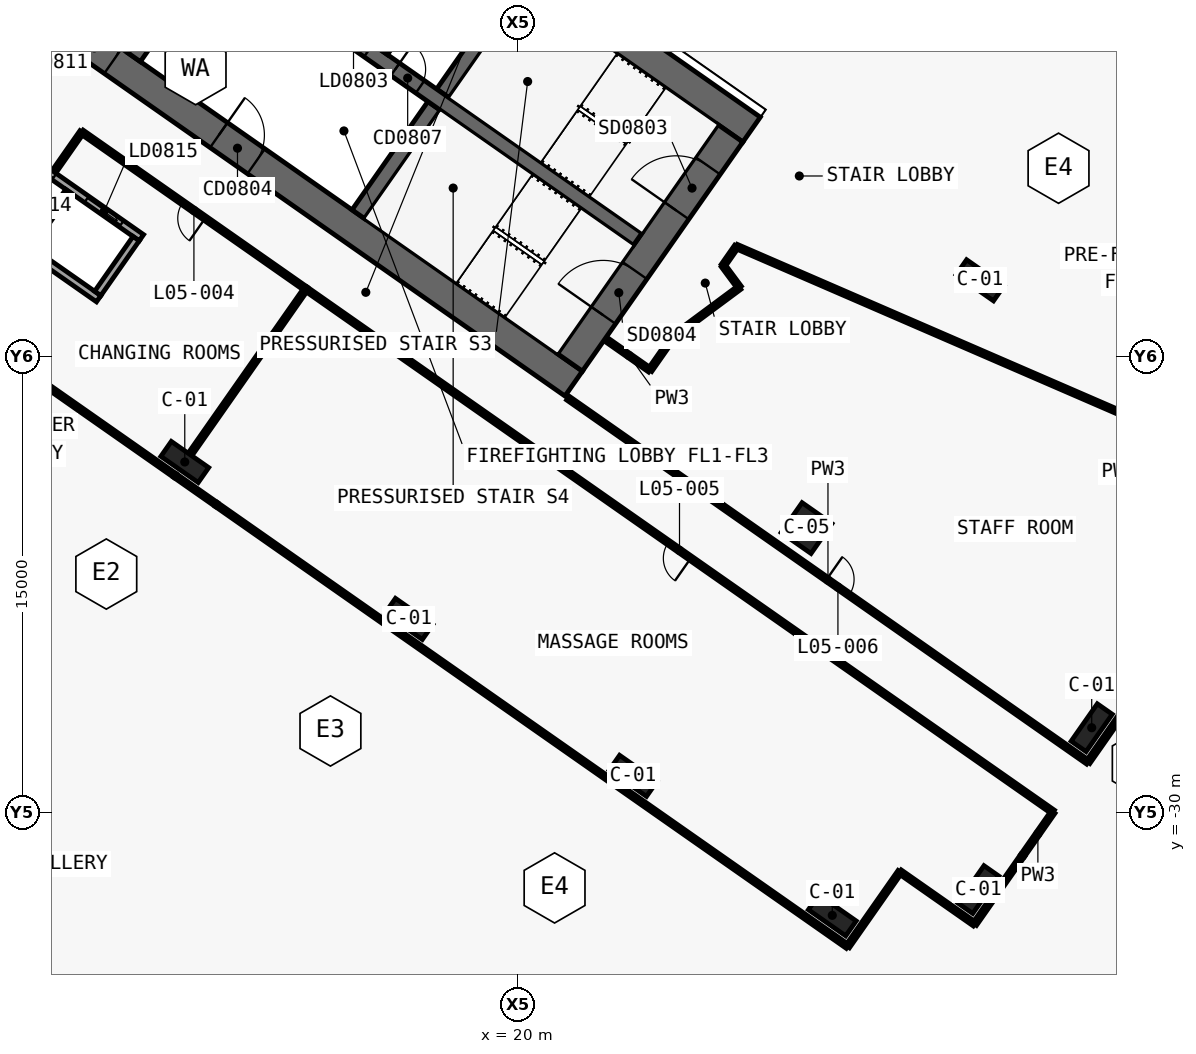
"""IFC4 building model, lengths in metres.
Left out: names, types, materials, properties, quantities, classifications, styles, units other than length and angle.
Written with IfcOpenShell. Run it as: python <this file> out.ifc"""

import sys

from ifc_helpers import new_model, si_unit, direction, frame, frame_2d, origin, origin_2d, place, context, subcontext, project, spatial, polyline, rectangle, outline, extrude, element, fill, save


model = new_model("IFC4")
c1 = context("Model", 3, precision=1e-05, world=origin(), true_north=direction((0.0, 1.0)))
c2 = subcontext(c1, "Body", "Model", "MODEL_VIEW")
j1 = project(units=[si_unit("LENGTHUNIT", "METRE"), si_unit("PLANEANGLEUNIT", "RADIAN")], contexts=[c1])
p1 = place(None, origin())
s1 = spatial("IfcSite", under=j1, at=p1, CompositionType="ELEMENT")
p2 = place(p1, origin())
s2 = spatial("IfcBuilding", under=s1, at=p2, CompositionType="ELEMENT")
p3 = place(p2, frame((0.0, 0.0, 37.5)))
s3 = spatial("IfcBuildingStorey", under=s2, at=p3, CompositionType="ELEMENT", Elevation=37.5)
p4 = place(p3, frame((-0.037, 11.867, 0.0), z_axis=(0.0, 0.0, 1.0), x_axis=(0.819155306259, -0.573571777746, 0.0)))
e1 = element("IfcWall", 1, at=p4, inside=s3, PredefinedType="SHEAR", context=c2, shape_type="SweptSolid", body=[
    extrude(outline(polyline([(33.837, 0.5), (0.0, 0.5), (0.7, -0.5), (33.837, -0.5), (33.837, 0.5)])), origin(), (0.0, 0.0, 1.0), 5.5),
])
p5 = place(p3, frame((-0.037, -0.585, 0.0), z_axis=(0.0, 0.0, 1.0), x_axis=(0.819157152511, -0.573569140985, 0.0)))
e2 = element("IfcWall", 2, at=p5, inside=s3, PredefinedType="SHEAR", context=c2, shape_type="SweptSolid", body=[
    extrude(outline(polyline([(26.695, 0.5), (0.0, 0.5), (0.7, -0.5), (26.695, -0.5), (26.695, 0.5)])), origin(), (0.0, 0.0, 1.0), 5.5),
])
p6 = place(p5, frame((6.695, 0.0, 0.0)))
e3 = element("IfcOpeningElement", 3, at=p6, cuts=e2, PredefinedType="OPENING", context=c2, shape_type="SweptSolid", body=[
    extrude(rectangle(XDim=1.5, YDim=2.1, at=frame_2d((0.75, 1.05))), frame((0.0, 0.51, 0.0), z_axis=(0.0, -1.0, 0.0), x_axis=(1.0, 0.0, 0.0)), (0.0, 0.0, 1.0), 1.02),
])
p7 = place(p5, frame((12.445, 0.0, 0.0)))
e4 = element("IfcOpeningElement", 4, at=p7, cuts=e2, PredefinedType="OPENING", context=c2, shape_type="SweptSolid", body=[
    extrude(rectangle(XDim=1.5, YDim=2.1, at=frame_2d((0.75, 1.05))), frame((0.0, 0.51, 0.0), z_axis=(0.0, -1.0, 0.0), x_axis=(1.0, 0.0, 0.0)), (0.0, 0.0, 1.0), 1.02),
])
p8 = place(p3, frame((21.708, -15.2, 0.0), z_axis=(0.0, 0.0, 1.0), x_axis=(0.573576324356, 0.819152122709, 0.0)))
e5 = element("IfcWall", 5, at=p8, inside=s3, PredefinedType="SHEAR", context=c2, shape_type="SweptSolid", body=[
    extrude(outline(polyline([(9.2, 0.5), (0.0, 0.5), (0.0, -0.5), (9.2, -0.5), (9.2, 0.5)])), origin(), (0.0, 0.0, 1.0), 5.5),
])
p9 = place(p8, frame((6.1, 0.0, 0.0)))
e6 = element("IfcOpeningElement", 6, at=p9, cuts=e5, PredefinedType="OPENING", context=c2, shape_type="SweptSolid", body=[
    extrude(rectangle(XDim=1.8, YDim=2.1, at=frame_2d((0.9, 1.05))), frame((0.0, 0.51, 0.0), z_axis=(0.0, -1.0, 0.0), x_axis=(1.0, 0.0, 0.0)), (0.0, 0.0, 1.0), 1.02),
])
p10 = place(p8, frame((1.9, 0.0, 0.0)))
e7 = element("IfcOpeningElement", 7, at=p10, cuts=e5, PredefinedType="OPENING", context=c2, shape_type="SweptSolid", body=[
    extrude(rectangle(XDim=1.8, YDim=2.1, at=frame_2d((0.9, 1.05))), frame((0.0, 0.51, 0.0), z_axis=(0.0, -1.0, 0.0), x_axis=(1.0, 0.0, 0.0)), (0.0, 0.0, 1.0), 1.02),
])
p11 = place(p3, frame((7.372, -5.162, 0.0), z_axis=(0.0, 0.0, 1.0), x_axis=(0.573594173421, 0.819139624372, 0.0)))
e8 = element("IfcWall", 8, at=p11, inside=s3, PredefinedType="SHEAR", context=c2, shape_type="SweptSolid", body=[
    extrude(outline(polyline([(0.0, 0.25), (0.0, -0.25), (4.35, -0.25), (4.35, 0.25), (0.0, 0.25)])), origin(), (0.0, 0.0, 1.0), 5.5),
])
p12 = place(p3, frame((14.745, -10.324, 0.0), z_axis=(0.0, 0.0, 1.0), x_axis=(0.57356780395, 0.819158088694, 0.0)))
e9 = element("IfcWall", 9, at=p12, inside=s3, PredefinedType="SHEAR", context=c2, shape_type="SweptSolid", body=[
    extrude(outline(polyline([(0.0, 0.25), (0.0, -0.25), (4.35, -0.25), (4.35, 0.25), (0.0, 0.25)])), origin(), (0.0, 0.0, 1.0), 5.5),
])
p13 = place(p3, frame((17.527, -6.352, 0.0), z_axis=(0.0, 0.0, 1.0), x_axis=(0.573530143085, 0.819184457233, 0.0)))
e10 = element("IfcWall", 10, at=p13, inside=s3, PredefinedType="SHEAR", context=c2, shape_type="SweptSolid", body=[
    extrude(outline(polyline([(4.35, -0.25), (4.35, 0.25), (0.0, 0.25), (0.0, -0.25), (4.35, -0.25)])), origin(), (0.0, 0.0, 1.0), 5.5),
])
p14 = place(p3, frame((2.638, 3.768, 0.0), z_axis=(0.0, 0.0, 1.0), x_axis=(0.819148977158, -0.573580816643, 0.0)))
e11 = element("IfcWall", 11, at=p14, inside=s3, PredefinedType="SHEAR", context=c2, shape_type="SweptSolid", body=[
    extrude(outline(polyline([(0.0, 0.25), (0.0, -0.25), (26.0, -0.25), (26.0, 0.25), (0.0, 0.25)])), origin(), (0.0, 0.0, 1.0), 5.5),
])
p15 = place(p14, frame((9.637, 0.0, 0.0)))
e12 = element("IfcOpeningElement", 12, at=p15, cuts=e11, PredefinedType="OPENING", context=c2, shape_type="SweptSolid", body=[
    extrude(rectangle(XDim=1.2, YDim=2.1, at=frame_2d((0.6, 1.05))), frame((0.0, 0.26, 0.0), z_axis=(0.0, -1.0, 0.0), x_axis=(1.0, 0.0, 0.0)), (0.0, 0.0, 1.0), 0.52),
])
p16 = place(p14, frame((11.812, 0.0, 0.0)))
e13 = element("IfcOpeningElement", 13, at=p16, cuts=e11, PredefinedType="OPENING", context=c2, shape_type="SweptSolid", body=[
    extrude(rectangle(XDim=1.2, YDim=2.1, at=frame_2d((0.6, 1.05))), frame((0.0, 0.26, 0.0), z_axis=(0.0, -1.0, 0.0), x_axis=(1.0, 0.0, 0.0)), (0.0, 0.0, 1.0), 0.52),
])
p17 = place(p14, frame((13.988, 0.0, 0.0)))
e14 = element("IfcOpeningElement", 14, at=p17, cuts=e11, PredefinedType="OPENING", context=c2, shape_type="SweptSolid", body=[
    extrude(rectangle(XDim=1.2, YDim=2.1, at=frame_2d((0.6, 1.05))), frame((0.0, 0.26, 0.0), z_axis=(0.0, -1.0, 0.0), x_axis=(1.0, 0.0, 0.0)), (0.0, 0.0, 1.0), 0.52),
])
p18 = place(p14, frame((16.262, 0.0, 0.0)))
e15 = element("IfcOpeningElement", 15, at=p18, cuts=e11, PredefinedType="OPENING", context=c2, shape_type="SweptSolid", body=[
    extrude(rectangle(XDim=1.0, YDim=2.1, at=frame_2d((0.5, 1.05))), frame((0.0, 0.26, 0.0), z_axis=(0.0, -1.0, 0.0), x_axis=(1.0, 0.0, 0.0)), (0.0, 0.0, 1.0), 0.52),
])
for number, where, z_axis, x_axis in (
    (16, (9.038, -18.475, 0.0), (0.0, 0.0, 1.0), (0.819, -0.574, 0.0)),
    (17, (16.41, -23.637, 0.0), (0.0, 0.0, 1.0), (0.819, -0.574, 0.0)),
    (18, (23.782, -28.799, 0.0), (0.0, 0.0, 1.0), (0.819, -0.574, 0.0)),
    (19, (30.336, -33.388, 0.0), (0.0, 0.0, 1.0), (0.819, -0.574, 0.0)),
    (20, (35.197, -12.498, 0.0), (0.0, 0.0, 1.0), (0.819, -0.574, 0.0)),
    (21, (35.14, -32.541, 0.0), (0.0, 0.0, 1.0), (0.574, 0.819, 0.0)),
    (22, (38.869, -27.216, 0.0), (0.0, 0.0, 1.0), (0.574, 0.819, 0.0)),
):
    element("IfcColumn", number, at=place(p3, frame(where, z_axis=z_axis, x_axis=x_axis)), inside=s3, PredefinedType="COLUMN", context=c2, shape_type="SweptSolid", body=[
        extrude(rectangle(XDim=1.5, YDim=0.6, at=origin_2d()), origin(), (0.0, 0.0, 1.0), 5.5),
    ])
p19 = place(p3, frame((29.49, -20.649, 0.0), z_axis=(0.0, 0.0, 1.0), x_axis=(0.819152044289, -0.573576436351, 0.0)))
e23 = element("IfcColumn", 23, at=p19, inside=s3, PredefinedType="COLUMN", context=c2, shape_type="SweptSolid", body=[
    extrude(rectangle(XDim=1.2, YDim=1.2, at=origin_2d()), origin(), (0.0, 0.0, 1.0), 5.5),
])
p20 = place(p3, frame((15.622, -5.018, 0.0), z_axis=(0.0, 0.0, 1.0), x_axis=(0.573594173421, 0.819139624372, 0.0)))
e24 = element("IfcWall", 24, at=p20, inside=s3, PredefinedType="SOLIDWALL", context=c2, shape_type="SweptSolid", body=[
    extrude(rectangle(XDim=4.35, YDim=0.2, at=frame_2d((2.175, 0.0))), origin(), (0.0, 0.0, 1.0), 5.5),
])
p21 = place(p3, frame((-2.887, -6.738, 0.0), z_axis=(0.0, 0.0, 1.0), x_axis=(0.819150280716, -0.573578954985, 0.0)))
e25 = element("IfcWall", 25, at=p21, inside=s3, PredefinedType="SOLIDWALL", context=c2, shape_type="SweptSolid", body=[
    extrude(rectangle(XDim=11.1, YDim=0.25, at=frame_2d((5.55, 0.0))), origin(), (0.0, 0.0, 1.0), 5.5),
])
p22 = place(p3, frame((-1.481, -4.731, 0.0), z_axis=(0.0, 0.0, 1.0), x_axis=(0.819150280716, -0.573578954985, 0.0)))
e26 = element("IfcWall", 26, at=p22, inside=s3, PredefinedType="SOLIDWALL", context=c2, shape_type="SweptSolid", body=[
    extrude(rectangle(XDim=11.1, YDim=0.25, at=frame_2d((5.55, 0.0))), origin(), (0.0, 0.0, 1.0), 5.5),
])
p23 = place(p22, frame((0.8, 0.0, 0.0)))
e27 = element("IfcOpeningElement", 27, at=p23, cuts=e26, PredefinedType="OPENING", context=c2, shape_type="SweptSolid", body=[
    extrude(rectangle(XDim=1.4, YDim=2.1, at=frame_2d((0.7, 1.05))), frame((0.0, 0.135, 0.0), z_axis=(0.0, -1.0, 0.0), x_axis=(1.0, 0.0, 0.0)), (0.0, 0.0, 1.0), 0.27),
])
p24 = place(p22, frame((3.5, 0.0, 0.0)))
e28 = element("IfcOpeningElement", 28, at=p24, cuts=e26, PredefinedType="OPENING", context=c2, shape_type="SweptSolid", body=[
    extrude(rectangle(XDim=1.4, YDim=2.1, at=frame_2d((0.7, 1.05))), frame((0.0, 0.135, 0.0), z_axis=(0.0, -1.0, 0.0), x_axis=(1.0, 0.0, 0.0)), (0.0, 0.0, 1.0), 0.27),
])
p25 = place(p22, frame((6.2, 0.0, 0.0)))
e29 = element("IfcOpeningElement", 29, at=p25, cuts=e26, PredefinedType="OPENING", context=c2, shape_type="SweptSolid", body=[
    extrude(rectangle(XDim=1.4, YDim=2.1, at=frame_2d((0.7, 1.05))), frame((0.0, 0.135, 0.0), z_axis=(0.0, -1.0, 0.0), x_axis=(1.0, 0.0, 0.0)), (0.0, 0.0, 1.0), 0.27),
])
p26 = place(p22, frame((8.9, 0.0, 0.0)))
e30 = element("IfcOpeningElement", 30, at=p26, cuts=e26, PredefinedType="OPENING", context=c2, shape_type="SweptSolid", body=[
    extrude(rectangle(XDim=1.4, YDim=2.1, at=frame_2d((0.7, 1.05))), frame((0.0, 0.135, 0.0), z_axis=(0.0, -1.0, 0.0), x_axis=(1.0, 0.0, 0.0)), (0.0, 0.0, 1.0), 0.27),
])
p27 = place(p3, frame((6.175, -12.93, 0.0), z_axis=(0.0, 0.0, 1.0), x_axis=(0.573559170999, 0.819164133348, 0.0)))
e31 = element("IfcWall", 31, at=p27, inside=s3, PredefinedType="SOLIDWALL", context=c2, shape_type="SweptSolid", body=[
    extrude(rectangle(XDim=2.2, YDim=0.25, at=frame_2d((1.1, 0.0))), origin(), (0.0, 0.0, 1.0), 5.5),
])
p28 = place(p3, frame((3.943, -11.367, 0.0), z_axis=(0.0, 0.0, 1.0), x_axis=(0.573507030513, 0.819200638399, 0.0)))
e32 = element("IfcWall", 32, at=p28, inside=s3, PredefinedType="SOLIDWALL", context=c2, shape_type="SweptSolid", body=[
    extrude(rectangle(XDim=2.2, YDim=0.2, at=frame_2d((1.1, 0.0))), origin(), (0.0, 0.0, 1.0), 5.5),
])
p29 = place(p3, frame((21.642, -16.375, 0.0), z_axis=(0.0, 0.0, 1.0), x_axis=(0.819148965066, -0.573580833911, 0.0)))
e33 = element("IfcWall", 33, at=p29, inside=s3, PredefinedType="PARTITIONING", context=c2, shape_type="SweptSolid", body=[
    extrude(rectangle(XDim=20.88, YDim=0.15, at=frame_2d((10.44, 0.0))), origin(), (0.0, 0.0, 1.0), 3.68),
])
p30 = place(p29, frame((10.39, 0.0, 0.0)))
e34 = element("IfcOpeningElement", 34, at=p30, cuts=e33, PredefinedType="OPENING", context=c2, shape_type="SweptSolid", body=[
    extrude(rectangle(XDim=0.9, YDim=2.1, at=frame_2d((0.45, 1.05))), frame((0.0, 0.085, 0.0), z_axis=(0.0, -1.0, 0.0), x_axis=(1.0, 0.0, 0.0)), (0.0, 0.0, 1.0), 0.17),
])
p31 = place(p3, frame((13.026, -12.783, 0.0), z_axis=(0.0, 0.0, 1.0), x_axis=(-0.81915291695, 0.57357519006, 0.0)))
e35 = element("IfcWall", 35, at=p31, inside=s3, PredefinedType="PARTITIONING", context=c2, shape_type="SweptSolid", body=[
    extrude(rectangle(XDim=9.002, YDim=0.15, at=frame_2d((4.501, 0.0))), origin(), (0.0, 0.0, 1.0), 3.68),
])
p32 = place(p31, frame((4.051, 0.0, 0.0)))
e36 = element("IfcOpeningElement", 36, at=p32, cuts=e35, PredefinedType="OPENING", context=c2, shape_type="SweptSolid", body=[
    extrude(rectangle(XDim=0.9, YDim=2.1, at=frame_2d((0.45, 1.05))), frame((0.0, 0.085, 0.0), z_axis=(0.0, -1.0, 0.0), x_axis=(1.0, 0.0, 0.0)), (0.0, 0.0, 1.0), 0.17),
])
p33 = place(p3, frame((37.599, -29.989, 0.0), z_axis=(0.0, 0.0, 1.0), x_axis=(-0.819154688631, 0.57357265982, 0.0)))
e37 = element("IfcWall", 37, at=p33, inside=s3, PredefinedType="PARTITIONING", context=c2, shape_type="SweptSolid", body=[
    extrude(rectangle(XDim=30.002, YDim=0.15, at=frame_2d((15.001, 0.0))), origin(), (0.0, 0.0, 1.0), 3.68),
])
p34 = place(p33, frame((14.551, 0.0, 0.0)))
e38 = element("IfcOpeningElement", 38, at=p34, cuts=e37, PredefinedType="OPENING", context=c2, shape_type="SweptSolid", body=[
    extrude(rectangle(XDim=0.9, YDim=2.1, at=frame_2d((0.45, 1.05))), frame((0.0, 0.085, 0.0), z_axis=(0.0, -1.0, 0.0), x_axis=(1.0, 0.0, 0.0)), (0.0, 0.0, 1.0), 0.17),
])
p35 = place(p3, frame((43.621, -21.388, 0.0), z_axis=(0.0, 0.0, 1.0), x_axis=(-0.57357799764, -0.819150951061, 0.0)))
e39 = element("IfcWall", 39, at=p35, inside=s3, PredefinedType="PARTITIONING", context=c2, shape_type="SweptSolid", body=[
    extrude(rectangle(XDim=8.5, YDim=0.15, at=frame_2d((4.25, 0.0))), origin(), (0.0, 0.0, 1.0), 5.1),
])
p36 = place(p3, frame((26.746, -12.014, 0.0), z_axis=(0.0, 0.0, 1.0), x_axis=(0.573761975376, 0.819022097146, 0.0)))
e40 = element("IfcWall", 40, at=p36, inside=s3, PredefinedType="PARTITIONING", context=c2, shape_type="SweptSolid", body=[
    extrude(rectangle(XDim=0.765, YDim=0.15, at=frame_2d((0.383, 0.0))), origin(), (0.0, 0.0, 1.0), 5.1),
])
p37 = place(p3, frame((27.185, -11.387, 0.0), z_axis=(0.0, 0.0, 1.0), x_axis=(0.917531384635, -0.397663372979, 0.0)))
e41 = element("IfcWall", 41, at=p37, inside=s3, PredefinedType="PARTITIONING", context=c2, shape_type="SweptSolid", body=[
    extrude(rectangle(XDim=16.536, YDim=0.15, at=frame_2d((8.268, 0.0))), origin(), (0.0, 0.0, 1.0), 3.68),
])
p38 = place(p3, frame((22.961, -14.49, 0.0), z_axis=(0.0, 0.0, 1.0), x_axis=(0.819109000826, -0.573637903879, 0.0)))
e42 = element("IfcWall", 42, at=p38, inside=s3, PredefinedType="PARTITIONING", context=c2, shape_type="SweptSolid", body=[
    extrude(rectangle(XDim=1.68, YDim=0.15, at=frame_2d((0.84, 0.0))), origin(), (0.0, 0.0, 1.0), 5.1),
])
p39 = place(p3, frame((24.337, -15.454, 0.0), z_axis=(0.0, 0.0, 1.0), x_axis=(0.573571252353, 0.819155674139, 0.0)))
e43 = element("IfcWall", 43, at=p39, inside=s3, PredefinedType="PARTITIONING", context=c2, shape_type="SweptSolid", body=[
    extrude(rectangle(XDim=1.354, YDim=0.15, at=frame_2d((0.677, 0.0))), origin(), (0.0, 0.0, 1.0), 5.1),
])
p40 = place(p3, frame((25.114, -14.345, 0.0), z_axis=(0.0, 0.0, 1.0), x_axis=(0.803211070557, 0.595694532571, 0.0)))
e44 = element("IfcWall", 44, at=p40, inside=s3, PredefinedType="PARTITIONING", context=c2, shape_type="SweptSolid", body=[
    extrude(rectangle(XDim=2.7, YDim=0.15, at=frame_2d((1.35, 0.0))), origin(), (0.0, 0.0, 1.0), 5.1),
])
p41 = place(p3, frame((27.282, -12.737, 0.0), z_axis=(0.0, 0.0, 1.0), x_axis=(-0.595869495235, 0.803081281471, 0.0)))
e45 = element("IfcWall", 45, at=p41, inside=s3, PredefinedType="PARTITIONING", context=c2, shape_type="SweptSolid", body=[
    extrude(rectangle(XDim=0.9, YDim=0.15, at=frame_2d((0.45, 0.0))), origin(), (0.0, 0.0, 1.0), 5.1),
])
p42 = place(p3, frame((13.024, -12.782, 0.0), z_axis=(0.0, 0.0, 1.0), x_axis=(-0.573556251799, -0.819166177294, 0.0)))
e46 = element("IfcWall", 46, at=p42, inside=s3, PredefinedType="PARTITIONING", context=c2, shape_type="SweptSolid", body=[
    extrude(rectangle(XDim=6.63, YDim=0.15, at=frame_2d((3.315, 0.0))), origin(), (0.0, 0.0, 1.0), 3.68),
])
p43 = place(p3, frame((8.722, -18.926, 0.0), z_axis=(0.0, 0.0, 1.0), x_axis=(-0.819141427692, 0.573591598124, 0.0)))
e47 = element("IfcWall", 47, at=p43, inside=s3, PredefinedType="PARTITIONING", context=c2, shape_type="SweptSolid", body=[
    extrude(rectangle(XDim=9.0, YDim=0.15, at=frame_2d((4.5, 0.0))), origin(), (0.0, 0.0, 1.0), 5.1),
])
p44 = place(p3, frame((4.763, -8.889, 0.0), z_axis=(0.0, 0.0, 1.0), x_axis=(0.573494057365, 0.819209720504, 0.0)))
e48 = element("IfcWall", 48, at=p44, inside=s3, PredefinedType="PARTITIONING", context=c2, shape_type="SweptSolid", body=[
    extrude(rectangle(XDim=1.55, YDim=0.15, at=frame_2d((0.775, 0.0))), origin(), (0.0, 0.0, 1.0), 3.68),
])
p45 = place(p3, frame((32.56, -31.955, 0.0), z_axis=(0.0, 0.0, 1.0), x_axis=(-0.573560650686, -0.819163097304, 0.0)))
e49 = element("IfcWall", 49, at=p45, inside=s3, PredefinedType="PARTITIONING", context=c2, shape_type="SweptSolid", body=[
    extrude(rectangle(XDim=3.0, YDim=0.15, at=frame_2d((1.5, 0.0))), origin(), (0.0, 0.0, 1.0), 3.88),
])
p46 = place(p3, frame((30.839, -34.412, 0.0), z_axis=(0.0, 0.0, 1.0), x_axis=(-0.819153188106, 0.573574802808, 0.0)))
e50 = element("IfcWall", 50, at=p46, inside=s3, PredefinedType="PARTITIONING", context=c2, shape_type="SweptSolid", body=[
    extrude(rectangle(XDim=25.351, YDim=0.15, at=frame_2d((12.675, 0.0))), origin(), (0.0, 0.0, 1.0), 5.1),
])
p47 = place(p3, frame((36.599, -31.417, 0.0), z_axis=(0.0, 0.0, 1.0), x_axis=(-0.573557416232, -0.819165361991, 0.0)))
e51 = element("IfcWall", 51, at=p47, inside=s3, PredefinedType="PARTITIONING", context=c2, shape_type="SweptSolid", body=[
    extrude(rectangle(XDim=2.757, YDim=0.15, at=frame_2d((1.379, 0.0))), origin(), (0.0, 0.0, 1.0), 5.1),
])
p48 = place(p3, frame((35.018, -33.675, 0.0), z_axis=(0.0, 0.0, 1.0), x_axis=(-0.819163097304, 0.573560650686, 0.0)))
e52 = element("IfcWall", 52, at=p48, inside=s3, PredefinedType="PARTITIONING", context=c2, shape_type="SweptSolid", body=[
    extrude(rectangle(XDim=3.0, YDim=0.15, at=frame_2d((1.5, 0.0))), origin(), (0.0, 0.0, 1.0), 3.88),
])
p49 = place(p3, frame((37.599, -29.989, 0.0), z_axis=(0.0, 0.0, 1.0), x_axis=(-0.573575034625, -0.819153025786, 0.0)))
e53 = element("IfcWall", 53, at=p49, inside=s3, PredefinedType="PARTITIONING", context=c2, shape_type="SweptSolid", body=[
    extrude(rectangle(XDim=1.745, YDim=0.15, at=frame_2d((0.872, 0.0))), origin(), (0.0, 0.0, 1.0), 5.1),
])
p50 = place(p3, frame((10.075, -19.873, 0.0), z_axis=(0.0, 0.0, 1.0), x_axis=(-0.819190252408, 0.573521865634, 0.0)))
e54 = element("IfcWall", 54, at=p50, inside=s3, PredefinedType="PARTITIONING", context=c2, shape_type="SweptSolid", body=[
    extrude(rectangle(XDim=1.652, YDim=0.15, at=frame_2d((0.826, 0.0))), origin(), (0.0, 0.0, 1.0), 4.08),
])
p51 = place(p18, origin())
e55 = element("IfcDoor", 55, at=p51, inside=s3, OperationType="SINGLE_SWING_RIGHT", PredefinedType="DOOR", context=c2, shape_type="SweptSolid", body=[
    extrude(rectangle(XDim=1.0, YDim=2.1, at=frame_2d((0.5, 1.05))), frame((0.0, 0.025, 0.0), z_axis=(0.0, -1.0, 0.0), x_axis=(1.0, 0.0, 0.0)), (0.0, 0.0, 1.0), 0.05),
])
fill(e15, e55)
p52 = place(p6, origin())
e56 = element("IfcDoor", 56, at=p52, inside=s3, OperationType="SINGLE_SWING_RIGHT", PredefinedType="DOOR", context=c2, shape_type="SweptSolid", body=[
    extrude(rectangle(XDim=1.5, YDim=2.1, at=frame_2d((0.75, 1.05))), frame((0.0, 0.025, 0.0), z_axis=(0.0, -1.0, 0.0), x_axis=(1.0, 0.0, 0.0)), (0.0, 0.0, 1.0), 0.05),
])
fill(e3, e56)
p53 = place(p7, origin())
e57 = element("IfcDoor", 57, at=p53, inside=s3, OperationType="DOUBLE_DOOR_SINGLE_SWING", PredefinedType="DOOR", context=c2, shape_type="SweptSolid", body=[
    extrude(rectangle(XDim=1.5, YDim=2.1, at=frame_2d((0.75, 1.05))), frame((0.0, 0.025, 0.0), z_axis=(0.0, -1.0, 0.0), x_axis=(1.0, 0.0, 0.0)), (0.0, 0.0, 1.0), 0.05),
])
fill(e4, e57)
p54 = place(p9, origin())
e58 = element("IfcDoor", 58, at=p54, inside=s3, OperationType="DOUBLE_DOOR_SINGLE_SWING", PredefinedType="DOOR", context=c2, shape_type="SweptSolid", body=[
    extrude(rectangle(XDim=1.8, YDim=2.1, at=frame_2d((0.9, 1.05))), frame((0.0, 0.025, 0.0), z_axis=(0.0, -1.0, 0.0), x_axis=(1.0, 0.0, 0.0)), (0.0, 0.0, 1.0), 0.05),
])
fill(e6, e58)
p55 = place(p10, origin())
e59 = element("IfcDoor", 59, at=p55, inside=s3, OperationType="DOUBLE_DOOR_SINGLE_SWING", PredefinedType="DOOR", context=c2, shape_type="SweptSolid", body=[
    extrude(rectangle(XDim=1.8, YDim=2.1, at=frame_2d((0.9, 1.05))), frame((0.0, 0.025, 0.0), z_axis=(0.0, -1.0, 0.0), x_axis=(1.0, 0.0, 0.0)), (0.0, 0.0, 1.0), 0.05),
])
fill(e7, e59)
p56 = place(p25, origin())
e60 = element("IfcDoor", 60, at=p56, inside=s3, OperationType="SLIDING_TO_LEFT", PredefinedType="DOOR", context=c2, shape_type="SweptSolid", body=[
    extrude(rectangle(XDim=1.4, YDim=2.1, at=frame_2d((0.7, 1.05))), frame((0.0, 0.025, 0.0), z_axis=(0.0, -1.0, 0.0), x_axis=(1.0, 0.0, 0.0)), (0.0, 0.0, 1.0), 0.05),
])
fill(e29, e60)
p57 = place(p26, origin())
e61 = element("IfcDoor", 61, at=p57, inside=s3, OperationType="SLIDING_TO_RIGHT", PredefinedType="DOOR", context=c2, shape_type="SweptSolid", body=[
    extrude(rectangle(XDim=1.4, YDim=2.1, at=frame_2d((0.7, 1.05))), frame((0.0, 0.025, 0.0), z_axis=(0.0, -1.0, 0.0), x_axis=(1.0, 0.0, 0.0)), (0.0, 0.0, 1.0), 0.05),
])
fill(e30, e61)
p58 = place(p32, origin())
e62 = element("IfcDoor", 62, at=p58, inside=s3, OperationType="SINGLE_SWING_LEFT", PredefinedType="DOOR", context=c2, shape_type="SweptSolid", body=[
    extrude(rectangle(XDim=0.9, YDim=2.1, at=frame_2d((0.45, 1.05))), frame((0.0, 0.025, 0.0), z_axis=(0.0, -1.0, 0.0), x_axis=(1.0, 0.0, 0.0)), (0.0, 0.0, 1.0), 0.05),
])
fill(e36, e62)
p59 = place(p34, origin())
e63 = element("IfcDoor", 63, at=p59, inside=s3, OperationType="SINGLE_SWING_LEFT", PredefinedType="DOOR", context=c2, shape_type="SweptSolid", body=[
    extrude(rectangle(XDim=0.9, YDim=2.1, at=frame_2d((0.45, 1.05))), frame((0.0, 0.025, 0.0), z_axis=(0.0, -1.0, 0.0), x_axis=(1.0, 0.0, 0.0)), (0.0, 0.0, 1.0), 0.05),
])
fill(e38, e63)
p60 = place(p30, origin())
e64 = element("IfcDoor", 64, at=p60, inside=s3, OperationType="SINGLE_SWING_RIGHT", PredefinedType="DOOR", context=c2, shape_type="SweptSolid", body=[
    extrude(rectangle(XDim=0.9, YDim=2.1, at=frame_2d((0.45, 1.05))), frame((0.0, 0.025, 0.0), z_axis=(0.0, -1.0, 0.0), x_axis=(1.0, 0.0, 0.0)), (0.0, 0.0, 1.0), 0.05),
])
fill(e34, e64)
save(model, sys.argv[1])
